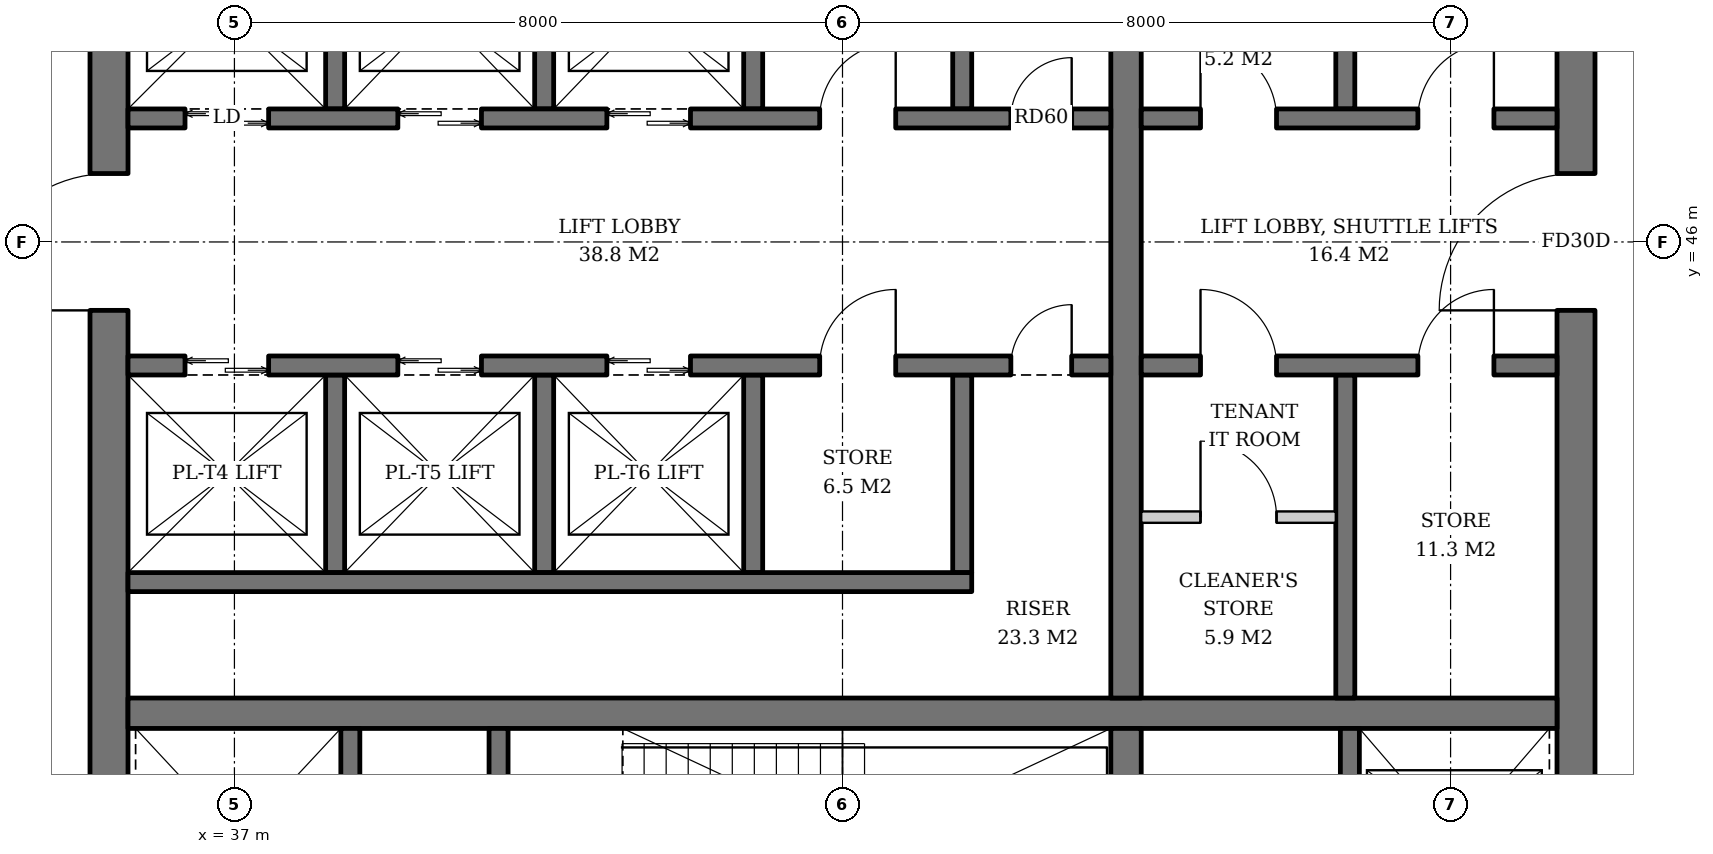
"""IFC4 building model, lengths in metres.
Left out: names, types, materials, properties, quantities, classifications, styles, units other than length and angle.
Written with IfcOpenShell. Run it as: python <this file> out.ifc"""

import sys

from ifc_helpers import new_model, si_unit, direction, frame, frame_2d, origin, place, context, subcontext, project, spatial, rectangle, extrude, element, fill, save


model = new_model("IFC4")
c1 = context("Model", 3, precision=1e-05, world=origin(), true_north=direction((0.0, 1.0)))
c2 = subcontext(c1, "Body", "Model", "MODEL_VIEW")
j1 = project(units=[si_unit("LENGTHUNIT", "METRE"), si_unit("PLANEANGLEUNIT", "RADIAN")], contexts=[c1])
p1 = place(None, origin())
s1 = spatial("IfcSite", under=j1, at=p1, CompositionType="ELEMENT")
p2 = place(p1, origin())
s2 = spatial("IfcBuilding", under=s1, at=p2, CompositionType="ELEMENT")
p3 = place(p2, frame((0.0, 0.0, 256.6)))
s3 = spatial("IfcBuildingStorey", under=s2, at=p3, CompositionType="ELEMENT", Elevation=256.6)
p4 = place(p3, frame((35.35, 36.6, 0.0), z_axis=(0.0, 0.0, 1.0), x_axis=(0.0, 1.0, 0.0)))
e1 = element("IfcWall", 1, at=p4, inside=s3, PredefinedType="SHEAR", context=c2, shape_type="SweptSolid", body=[
    extrude(rectangle(XDim=18.8, YDim=0.5, at=frame_2d((9.4, 0.0))), origin(), (0.0, 0.0, 1.0), 3.8),
])
p5 = place(p4, frame((8.5, 0.0, 0.0)))
e2 = element("IfcOpeningElement", 2, at=p5, cuts=e1, PredefinedType="OPENING", context=c2, shape_type="SweptSolid", body=[
    extrude(rectangle(XDim=1.8, YDim=2.4, at=frame_2d((0.9, 1.2))), frame((0.0, 0.26, 0.0), z_axis=(0.0, -1.0, 0.0), x_axis=(1.0, 0.0, 0.0)), (0.0, 0.0, 1.0), 0.52),
])
p6 = place(p3, frame((54.65, 36.6, 0.0), z_axis=(0.0, 0.0, 1.0), x_axis=(0.0, 1.0, 0.0)))
e3 = element("IfcWall", 3, at=p6, inside=s3, PredefinedType="SHEAR", context=c2, shape_type="SweptSolid", body=[
    extrude(rectangle(XDim=18.8, YDim=0.5, at=frame_2d((9.4, 0.0))), origin(), (0.0, 0.0, 1.0), 3.8),
])
p7 = place(p6, frame((8.5, 0.0, 0.0)))
e4 = element("IfcOpeningElement", 4, at=p7, cuts=e3, PredefinedType="OPENING", context=c2, shape_type="SweptSolid", body=[
    extrude(rectangle(XDim=1.8, YDim=2.4, at=frame_2d((0.9, 1.2))), frame((0.0, 0.26, 0.0), z_axis=(0.0, -1.0, 0.0), x_axis=(1.0, 0.0, 0.0)), (0.0, 0.0, 1.0), 0.52),
])
p8 = place(p3, frame((35.6, 39.8, 0.0), z_axis=(0.0, 0.0, 1.0), x_axis=(1.0, 0.0, 0.0)))
e5 = element("IfcWall", 5, at=p8, inside=s3, PredefinedType="SHEAR", context=c2, shape_type="SweptSolid", body=[
    extrude(rectangle(XDim=18.8, YDim=0.4, at=frame_2d((9.4, 0.0))), origin(), (0.0, 0.0, 1.0), 3.8),
])
p9 = place(p3, frame((48.73, 36.6, 0.0), z_axis=(0.0, 0.0, 1.0), x_axis=(0.0, 1.0, 0.0)))
e6 = element("IfcWall", 6, at=p9, inside=s3, PredefinedType="SHEAR", context=c2, shape_type="SweptSolid", body=[
    extrude(rectangle(XDim=3.0, YDim=0.4, at=frame_2d((1.5, 0.0))), origin(), (0.0, 0.0, 1.0), 3.8),
])
p10 = place(p3, frame((48.73, 40.0, 0.0), z_axis=(0.0, 0.0, 1.0), x_axis=(0.0, 1.0, 0.0)))
e7 = element("IfcWall", 7, at=p10, inside=s3, PredefinedType="SHEAR", context=c2, shape_type="SweptSolid", body=[
    extrude(rectangle(XDim=12.0, YDim=0.4, at=frame_2d((6.0, 0.0))), origin(), (0.0, 0.0, 1.0), 3.8),
])
p11 = place(p3, frame((38.525, 36.6, 0.0), z_axis=(0.0, 0.0, 1.0), x_axis=(0.0, 1.0, 0.0)))
e8 = element("IfcWall", 8, at=p11, inside=s3, PredefinedType="SHEAR", context=c2, shape_type="SweptSolid", body=[
    extrude(rectangle(XDim=3.0, YDim=0.25, at=frame_2d((1.5, 0.0))), origin(), (0.0, 0.0, 1.0), 3.8),
])
p12 = place(p11, frame((0.9, 0.0, 0.0)))
e9 = element("IfcOpeningElement", 9, at=p12, cuts=e8, PredefinedType="OPENING", context=c2, shape_type="SweptSolid", body=[
    extrude(rectangle(XDim=1.3, YDim=2.2, at=frame_2d((0.65, 1.1))), frame((0.0, 0.135, 0.0), z_axis=(0.0, -1.0, 0.0), x_axis=(1.0, 0.0, 0.0)), (0.0, 0.0, 1.0), 0.27),
])
p13 = place(p3, frame((40.475, 36.6, 0.0), z_axis=(0.0, 0.0, 1.0), x_axis=(0.0, 1.0, 0.0)))
e10 = element("IfcWall", 10, at=p13, inside=s3, PredefinedType="SHEAR", context=c2, shape_type="SweptSolid", body=[
    extrude(rectangle(XDim=3.0, YDim=0.25, at=frame_2d((1.5, 0.0))), origin(), (0.0, 0.0, 1.0), 3.8),
])
p14 = place(p13, frame((0.85, 0.0, 0.0)))
e11 = element("IfcOpeningElement", 11, at=p14, cuts=e10, PredefinedType="OPENING", context=c2, shape_type="SweptSolid", body=[
    extrude(rectangle(XDim=1.2, YDim=2.1, at=frame_2d((0.6, 1.05))), frame((0.0, 0.135, 0.0), z_axis=(0.0, -1.0, 0.0), x_axis=(1.0, 0.0, 0.0)), (0.0, 0.0, 1.0), 0.27),
])
p15 = place(p3, frame((51.675, 36.6, 0.0), z_axis=(0.0, 0.0, 1.0), x_axis=(0.0, 1.0, 0.0)))
e12 = element("IfcWall", 12, at=p15, inside=s3, PredefinedType="SHEAR", context=c2, shape_type="SweptSolid", body=[
    extrude(rectangle(XDim=3.0, YDim=0.25, at=frame_2d((1.5, 0.0))), origin(), (0.0, 0.0, 1.0), 3.8),
])
p16 = place(p15, frame((0.85, 0.0, 0.0)))
e13 = element("IfcOpeningElement", 13, at=p16, cuts=e12, PredefinedType="OPENING", context=c2, shape_type="SweptSolid", body=[
    extrude(rectangle(XDim=1.4, YDim=2.4, at=frame_2d((0.7, 1.2))), frame((0.0, 0.135, 0.0), z_axis=(0.0, -1.0, 0.0), x_axis=(1.0, 0.0, 0.0)), (0.0, 0.0, 1.0), 0.27),
])
for number, where, z_axis, x_axis in (
    (14, (38.325, 47.75, 0.0), (0.0, 0.0, 1.0), (0.0, 1.0, 0.0)),
    (15, (41.075, 47.75, 0.0), (0.0, 0.0, 1.0), (0.0, 1.0, 0.0)),
    (16, (43.825, 47.75, 0.0), (0.0, 0.0, 1.0), (0.0, 1.0, 0.0)),
    (17, (46.575, 47.75, 0.0), (0.0, 0.0, 1.0), (0.0, 1.0, 0.0)),
):
    element("IfcWall", number, at=place(p3, frame(where, z_axis=z_axis, x_axis=x_axis)), inside=s3, PredefinedType="SHEAR", context=c2, shape_type="SweptSolid", body=[
        extrude(rectangle(XDim=2.6, YDim=0.25, at=frame_2d((1.3, 0.0))), origin(), (0.0, 0.0, 1.0), 3.8),
    ])
p17 = place(p3, frame((35.6, 47.625, 0.0), z_axis=(0.0, 0.0, 1.0), x_axis=(1.0, 0.0, 0.0)))
e18 = element("IfcWall", 18, at=p17, inside=s3, PredefinedType="SHEAR", context=c2, shape_type="SweptSolid", body=[
    extrude(rectangle(XDim=12.93, YDim=0.25, at=frame_2d((6.465, 0.0))), origin(), (0.0, 0.0, 1.0), 3.8),
])
p18 = place(p17, frame((0.75, 0.0, 0.0)))
e19 = element("IfcOpeningElement", 19, at=p18, cuts=e18, PredefinedType="OPENING", context=c2, shape_type="SweptSolid", body=[
    extrude(rectangle(XDim=1.1, YDim=2.2, at=frame_2d((0.55, 1.1))), frame((0.0, 0.135, 0.0), z_axis=(0.0, -1.0, 0.0), x_axis=(1.0, 0.0, 0.0)), (0.0, 0.0, 1.0), 0.27),
])
p19 = place(p17, frame((3.55, 0.0, 0.0)))
e20 = element("IfcOpeningElement", 20, at=p19, cuts=e18, PredefinedType="OPENING", context=c2, shape_type="SweptSolid", body=[
    extrude(rectangle(XDim=1.1, YDim=2.2, at=frame_2d((0.55, 1.1))), frame((0.0, 0.135, 0.0), z_axis=(0.0, -1.0, 0.0), x_axis=(1.0, 0.0, 0.0)), (0.0, 0.0, 1.0), 0.27),
])
p20 = place(p17, frame((6.3, 0.0, 0.0)))
e21 = element("IfcOpeningElement", 21, at=p20, cuts=e18, PredefinedType="OPENING", context=c2, shape_type="SweptSolid", body=[
    extrude(rectangle(XDim=1.1, YDim=2.2, at=frame_2d((0.55, 1.1))), frame((0.0, 0.135, 0.0), z_axis=(0.0, -1.0, 0.0), x_axis=(1.0, 0.0, 0.0)), (0.0, 0.0, 1.0), 0.27),
])
p21 = place(p17, frame((9.1, 0.0, 0.0)))
e22 = element("IfcOpeningElement", 22, at=p21, cuts=e18, PredefinedType="OPENING", context=c2, shape_type="SweptSolid", body=[
    extrude(rectangle(XDim=1.0, YDim=2.1, at=frame_2d((0.5, 1.05))), frame((0.0, 0.135, 0.0), z_axis=(0.0, -1.0, 0.0), x_axis=(1.0, 0.0, 0.0)), (0.0, 0.0, 1.0), 0.27),
])
p22 = place(p17, frame((11.615, 0.0, 0.0)))
e23 = element("IfcOpeningElement", 23, at=p22, cuts=e18, PredefinedType="OPENING", context=c2, shape_type="SweptSolid", body=[
    extrude(rectangle(XDim=0.8, YDim=2.0, at=frame_2d((0.4, 1.0))), frame((0.0, 0.135, 0.0), z_axis=(0.0, -1.0, 0.0), x_axis=(1.0, 0.0, 0.0)), (0.0, 0.0, 1.0), 0.27),
])
for number, where, z_axis, x_axis in (
    (24, (38.325, 44.25, 0.0), (0.0, 0.0, 1.0), (0.0, -1.0, 0.0)),
    (25, (41.075, 44.25, 0.0), (0.0, 0.0, 1.0), (0.0, -1.0, 0.0)),
    (26, (43.825, 44.25, 0.0), (0.0, 0.0, 1.0), (0.0, -1.0, 0.0)),
    (27, (46.575, 44.25, 0.0), (0.0, 0.0, 1.0), (0.0, -1.0, 0.0)),
):
    element("IfcWall", number, at=place(p3, frame(where, z_axis=z_axis, x_axis=x_axis)), inside=s3, PredefinedType="SHEAR", context=c2, shape_type="SweptSolid", body=[
        extrude(rectangle(XDim=2.6, YDim=0.25, at=frame_2d((1.3, 0.0))), origin(), (0.0, 0.0, 1.0), 3.8),
    ])
p23 = place(p3, frame((35.6, 41.525, 0.0), z_axis=(0.0, 0.0, 1.0), x_axis=(1.0, 0.0, 0.0)))
e28 = element("IfcWall", 28, at=p23, inside=s3, PredefinedType="SHEAR", context=c2, shape_type="SweptSolid", body=[
    extrude(rectangle(XDim=11.1, YDim=0.25, at=frame_2d((5.55, 0.0))), origin(), (0.0, 0.0, 1.0), 3.8),
])
p24 = place(p3, frame((35.6, 44.375, 0.0), z_axis=(0.0, 0.0, 1.0), x_axis=(1.0, 0.0, 0.0)))
e29 = element("IfcWall", 29, at=p24, inside=s3, PredefinedType="SHEAR", context=c2, shape_type="SweptSolid", body=[
    extrude(rectangle(XDim=12.93, YDim=0.25, at=frame_2d((6.465, 0.0))), origin(), (0.0, 0.0, 1.0), 3.8),
])
p25 = place(p24, frame((0.75, 0.0, 0.0)))
e30 = element("IfcOpeningElement", 30, at=p25, cuts=e29, PredefinedType="OPENING", context=c2, shape_type="SweptSolid", body=[
    extrude(rectangle(XDim=1.1, YDim=2.2, at=frame_2d((0.55, 1.1))), frame((0.0, 0.135, 0.0), z_axis=(0.0, -1.0, 0.0), x_axis=(1.0, 0.0, 0.0)), (0.0, 0.0, 1.0), 0.27),
])
p26 = place(p24, frame((3.55, 0.0, 0.0)))
e31 = element("IfcOpeningElement", 31, at=p26, cuts=e29, PredefinedType="OPENING", context=c2, shape_type="SweptSolid", body=[
    extrude(rectangle(XDim=1.1, YDim=2.2, at=frame_2d((0.55, 1.1))), frame((0.0, 0.135, 0.0), z_axis=(0.0, -1.0, 0.0), x_axis=(1.0, 0.0, 0.0)), (0.0, 0.0, 1.0), 0.27),
])
p27 = place(p24, frame((6.3, 0.0, 0.0)))
e32 = element("IfcOpeningElement", 32, at=p27, cuts=e29, PredefinedType="OPENING", context=c2, shape_type="SweptSolid", body=[
    extrude(rectangle(XDim=1.1, YDim=2.2, at=frame_2d((0.55, 1.1))), frame((0.0, 0.135, 0.0), z_axis=(0.0, -1.0, 0.0), x_axis=(1.0, 0.0, 0.0)), (0.0, 0.0, 1.0), 0.27),
])
p28 = place(p24, frame((9.1, 0.0, 0.0)))
e33 = element("IfcOpeningElement", 33, at=p28, cuts=e29, PredefinedType="OPENING", context=c2, shape_type="SweptSolid", body=[
    extrude(rectangle(XDim=1.0, YDim=2.1, at=frame_2d((0.5, 1.05))), frame((0.0, 0.135, 0.0), z_axis=(0.0, -1.0, 0.0), x_axis=(1.0, 0.0, 0.0)), (0.0, 0.0, 1.0), 0.27),
])
p29 = place(p24, frame((11.615, 0.0, 0.0)))
e34 = element("IfcOpeningElement", 34, at=p29, cuts=e29, PredefinedType="OPENING", context=c2, shape_type="SweptSolid", body=[
    extrude(rectangle(XDim=0.8, YDim=2.0, at=frame_2d((0.4, 1.0))), frame((0.0, 0.135, 0.0), z_axis=(0.0, -1.0, 0.0), x_axis=(1.0, 0.0, 0.0)), (0.0, 0.0, 1.0), 0.27),
])
p30 = place(p3, frame((51.615, 47.75, 0.0), z_axis=(0.0, 0.0, 1.0), x_axis=(0.0, 1.0, 0.0)))
e35 = element("IfcWall", 35, at=p30, inside=s3, PredefinedType="SHEAR", context=c2, shape_type="SweptSolid", body=[
    extrude(rectangle(XDim=4.25, YDim=0.25, at=frame_2d((2.125, 0.0))), origin(), (0.0, 0.0, 1.0), 3.8),
])
p31 = place(p3, frame((48.93, 47.625, 0.0), z_axis=(0.0, 0.0, 1.0), x_axis=(1.0, 0.0, 0.0)))
e36 = element("IfcWall", 36, at=p31, inside=s3, PredefinedType="SHEAR", context=c2, shape_type="SweptSolid", body=[
    extrude(rectangle(XDim=5.47, YDim=0.25, at=frame_2d((2.735, 0.0))), origin(), (0.0, 0.0, 1.0), 3.8),
])
p32 = place(p31, frame((0.78, 0.0, 0.0)))
e37 = element("IfcOpeningElement", 37, at=p32, cuts=e36, PredefinedType="OPENING", context=c2, shape_type="SweptSolid", body=[
    extrude(rectangle(XDim=1.0, YDim=2.1, at=frame_2d((0.5, 1.05))), frame((0.0, 0.135, 0.0), z_axis=(0.0, -1.0, 0.0), x_axis=(1.0, 0.0, 0.0)), (0.0, 0.0, 1.0), 0.27),
])
p33 = place(p31, frame((3.64, 0.0, 0.0)))
e38 = element("IfcOpeningElement", 38, at=p33, cuts=e36, PredefinedType="OPENING", context=c2, shape_type="SweptSolid", body=[
    extrude(rectangle(XDim=1.0, YDim=2.1, at=frame_2d((0.5, 1.05))), frame((0.0, 0.135, 0.0), z_axis=(0.0, -1.0, 0.0), x_axis=(1.0, 0.0, 0.0)), (0.0, 0.0, 1.0), 0.27),
])
p34 = place(p3, frame((51.615, 44.25, 0.0), z_axis=(0.0, 0.0, 1.0), x_axis=(0.0, -1.0, 0.0)))
e39 = element("IfcWall", 39, at=p34, inside=s3, PredefinedType="SHEAR", context=c2, shape_type="SweptSolid", body=[
    extrude(rectangle(XDim=4.25, YDim=0.25, at=frame_2d((2.125, 0.0))), origin(), (0.0, 0.0, 1.0), 3.8),
])
p35 = place(p3, frame((48.93, 44.375, 0.0), z_axis=(0.0, 0.0, 1.0), x_axis=(1.0, 0.0, 0.0)))
e40 = element("IfcWall", 40, at=p35, inside=s3, PredefinedType="SHEAR", context=c2, shape_type="SweptSolid", body=[
    extrude(rectangle(XDim=5.47, YDim=0.25, at=frame_2d((2.735, 0.0))), origin(), (0.0, 0.0, 1.0), 3.8),
])
p36 = place(p35, frame((0.78, 0.0, 0.0)))
e41 = element("IfcOpeningElement", 41, at=p36, cuts=e40, PredefinedType="OPENING", context=c2, shape_type="SweptSolid", body=[
    extrude(rectangle(XDim=1.0, YDim=2.1, at=frame_2d((0.5, 1.05))), frame((0.0, 0.135, 0.0), z_axis=(0.0, -1.0, 0.0), x_axis=(1.0, 0.0, 0.0)), (0.0, 0.0, 1.0), 0.27),
])
p37 = place(p35, frame((3.64, 0.0, 0.0)))
e42 = element("IfcOpeningElement", 42, at=p37, cuts=e40, PredefinedType="OPENING", context=c2, shape_type="SweptSolid", body=[
    extrude(rectangle(XDim=1.0, YDim=2.1, at=frame_2d((0.5, 1.05))), frame((0.0, 0.135, 0.0), z_axis=(0.0, -1.0, 0.0), x_axis=(1.0, 0.0, 0.0)), (0.0, 0.0, 1.0), 0.27),
])
p38 = place(p3, frame((48.93, 42.38, 0.0), z_axis=(0.0, 0.0, 1.0), x_axis=(1.0, 0.0, 0.0)))
e43 = element("IfcWall", 43, at=p38, inside=s3, PredefinedType="SOLIDWALL", context=c2, shape_type="SweptSolid", body=[
    extrude(rectangle(XDim=2.56, YDim=0.15, at=frame_2d((1.28, 0.0))), origin(), (0.0, 0.0, 1.0), 3.62),
])
p39 = place(p38, frame((0.78, 0.0, 0.0)))
e44 = element("IfcOpeningElement", 44, at=p39, cuts=e43, PredefinedType="OPENING", context=c2, shape_type="SweptSolid", body=[
    extrude(rectangle(XDim=1.0, YDim=2.1, at=frame_2d((0.5, 1.05))), frame((0.0, 0.085, 0.0), z_axis=(0.0, -1.0, 0.0), x_axis=(1.0, 0.0, 0.0)), (0.0, 0.0, 1.0), 0.17),
])
p40 = place(p18, origin())
e45 = element("IfcDoor", 45, at=p40, inside=s3, OperationType="DOUBLE_DOOR_SLIDING", PredefinedType="DOOR", context=c2, shape_type="SweptSolid", body=[
    extrude(rectangle(XDim=1.1, YDim=2.2, at=frame_2d((0.55, 1.1))), frame((0.0, 0.025, 0.0), z_axis=(0.0, -1.0, 0.0), x_axis=(1.0, 0.0, 0.0)), (0.0, 0.0, 1.0), 0.05),
])
fill(e19, e45)
p41 = place(p19, origin())
e46 = element("IfcDoor", 46, at=p41, inside=s3, OperationType="DOUBLE_DOOR_SLIDING", PredefinedType="DOOR", context=c2, shape_type="SweptSolid", body=[
    extrude(rectangle(XDim=1.1, YDim=2.2, at=frame_2d((0.55, 1.1))), frame((0.0, 0.025, 0.0), z_axis=(0.0, -1.0, 0.0), x_axis=(1.0, 0.0, 0.0)), (0.0, 0.0, 1.0), 0.05),
])
fill(e20, e46)
p42 = place(p20, origin())
e47 = element("IfcDoor", 47, at=p42, inside=s3, OperationType="DOUBLE_DOOR_SLIDING", PredefinedType="DOOR", context=c2, shape_type="SweptSolid", body=[
    extrude(rectangle(XDim=1.1, YDim=2.2, at=frame_2d((0.55, 1.1))), frame((0.0, 0.025, 0.0), z_axis=(0.0, -1.0, 0.0), x_axis=(1.0, 0.0, 0.0)), (0.0, 0.0, 1.0), 0.05),
])
fill(e21, e47)
p43 = place(p21, origin())
e48 = element("IfcDoor", 48, at=p43, inside=s3, OperationType="SINGLE_SWING_RIGHT", PredefinedType="DOOR", context=c2, shape_type="SweptSolid", body=[
    extrude(rectangle(XDim=1.0, YDim=2.1, at=frame_2d((0.5, 1.05))), frame((0.0, 0.025, 0.0), z_axis=(0.0, -1.0, 0.0), x_axis=(1.0, 0.0, 0.0)), (0.0, 0.0, 1.0), 0.05),
])
fill(e22, e48)
p44 = place(p22, origin())
e49 = element("IfcDoor", 49, at=p44, inside=s3, OperationType="SINGLE_SWING_RIGHT", PredefinedType="DOOR", context=c2, shape_type="SweptSolid", body=[
    extrude(rectangle(XDim=0.8, YDim=2.0, at=frame_2d((0.4, 1.0))), frame((0.0, 0.025, 0.0), z_axis=(0.0, -1.0, 0.0), x_axis=(1.0, 0.0, 0.0)), (0.0, 0.0, 1.0), 0.05),
])
fill(e23, e49)
p45 = place(p25, origin())
e50 = element("IfcDoor", 50, at=p45, inside=s3, OperationType="DOUBLE_DOOR_SLIDING", PredefinedType="DOOR", context=c2, shape_type="SweptSolid", body=[
    extrude(rectangle(XDim=1.1, YDim=2.2, at=frame_2d((0.55, 1.1))), frame((0.0, 0.025, 0.0), z_axis=(0.0, -1.0, 0.0), x_axis=(1.0, 0.0, 0.0)), (0.0, 0.0, 1.0), 0.05),
])
fill(e30, e50)
p46 = place(p26, origin())
e51 = element("IfcDoor", 51, at=p46, inside=s3, OperationType="DOUBLE_DOOR_SLIDING", PredefinedType="DOOR", context=c2, shape_type="SweptSolid", body=[
    extrude(rectangle(XDim=1.1, YDim=2.2, at=frame_2d((0.55, 1.1))), frame((0.0, 0.025, 0.0), z_axis=(0.0, -1.0, 0.0), x_axis=(1.0, 0.0, 0.0)), (0.0, 0.0, 1.0), 0.05),
])
fill(e31, e51)
p47 = place(p27, origin())
e52 = element("IfcDoor", 52, at=p47, inside=s3, OperationType="DOUBLE_DOOR_SLIDING", PredefinedType="DOOR", context=c2, shape_type="SweptSolid", body=[
    extrude(rectangle(XDim=1.1, YDim=2.2, at=frame_2d((0.55, 1.1))), frame((0.0, 0.025, 0.0), z_axis=(0.0, -1.0, 0.0), x_axis=(1.0, 0.0, 0.0)), (0.0, 0.0, 1.0), 0.05),
])
fill(e32, e52)
p48 = place(p28, origin())
e53 = element("IfcDoor", 53, at=p48, inside=s3, OperationType="SINGLE_SWING_RIGHT", PredefinedType="DOOR", context=c2, shape_type="SweptSolid", body=[
    extrude(rectangle(XDim=1.0, YDim=2.1, at=frame_2d((0.5, 1.05))), frame((0.0, 0.025, 0.0), z_axis=(0.0, -1.0, 0.0), x_axis=(1.0, 0.0, 0.0)), (0.0, 0.0, 1.0), 0.05),
])
fill(e33, e53)
p49 = place(p29, origin())
e54 = element("IfcDoor", 54, at=p49, inside=s3, OperationType="SINGLE_SWING_RIGHT", PredefinedType="DOOR", context=c2, shape_type="SweptSolid", body=[
    extrude(rectangle(XDim=0.8, YDim=2.0, at=frame_2d((0.4, 1.0))), frame((0.0, 0.025, 0.0), z_axis=(0.0, -1.0, 0.0), x_axis=(1.0, 0.0, 0.0)), (0.0, 0.0, 1.0), 0.05),
])
fill(e34, e54)
p50 = place(p32, origin())
e55 = element("IfcDoor", 55, at=p50, inside=s3, OperationType="SINGLE_SWING_LEFT", PredefinedType="DOOR", context=c2, shape_type="SweptSolid", body=[
    extrude(rectangle(XDim=1.0, YDim=2.1, at=frame_2d((0.5, 1.05))), frame((0.0, 0.025, 0.0), z_axis=(0.0, -1.0, 0.0), x_axis=(1.0, 0.0, 0.0)), (0.0, 0.0, 1.0), 0.05),
])
fill(e37, e55)
p51 = place(p33, origin())
e56 = element("IfcDoor", 56, at=p51, inside=s3, OperationType="SINGLE_SWING_RIGHT", PredefinedType="DOOR", context=c2, shape_type="SweptSolid", body=[
    extrude(rectangle(XDim=1.0, YDim=2.1, at=frame_2d((0.5, 1.05))), frame((0.0, 0.025, 0.0), z_axis=(0.0, -1.0, 0.0), x_axis=(1.0, 0.0, 0.0)), (0.0, 0.0, 1.0), 0.05),
])
fill(e38, e56)
p52 = place(p36, origin())
e57 = element("IfcDoor", 57, at=p52, inside=s3, OperationType="SINGLE_SWING_LEFT", PredefinedType="DOOR", context=c2, shape_type="SweptSolid", body=[
    extrude(rectangle(XDim=1.0, YDim=2.1, at=frame_2d((0.5, 1.05))), frame((0.0, 0.025, 0.0), z_axis=(0.0, -1.0, 0.0), x_axis=(1.0, 0.0, 0.0)), (0.0, 0.0, 1.0), 0.05),
])
fill(e41, e57)
p53 = place(p37, origin())
e58 = element("IfcDoor", 58, at=p53, inside=s3, OperationType="SINGLE_SWING_RIGHT", PredefinedType="DOOR", context=c2, shape_type="SweptSolid", body=[
    extrude(rectangle(XDim=1.0, YDim=2.1, at=frame_2d((0.5, 1.05))), frame((0.0, 0.025, 0.0), z_axis=(0.0, -1.0, 0.0), x_axis=(1.0, 0.0, 0.0)), (0.0, 0.0, 1.0), 0.05),
])
fill(e42, e58)
p54 = place(p39, origin())
e59 = element("IfcDoor", 59, at=p54, inside=s3, OperationType="SINGLE_SWING_LEFT", PredefinedType="DOOR", context=c2, shape_type="SweptSolid", body=[
    extrude(rectangle(XDim=1.0, YDim=2.1, at=frame_2d((0.5, 1.05))), frame((0.0, 0.025, 0.0), z_axis=(0.0, -1.0, 0.0), x_axis=(1.0, 0.0, 0.0)), (0.0, 0.0, 1.0), 0.05),
])
fill(e44, e59)
p55 = place(p5, origin())
e60 = element("IfcDoor", 60, at=p55, inside=s3, OperationType="DOUBLE_DOOR_SINGLE_SWING", PredefinedType="DOOR", context=c2, shape_type="SweptSolid", body=[
    extrude(rectangle(XDim=1.8, YDim=2.4, at=frame_2d((0.9, 1.2))), frame((0.0, 0.025, 0.0), z_axis=(0.0, -1.0, 0.0), x_axis=(1.0, 0.0, 0.0)), (0.0, 0.0, 1.0), 0.05),
])
fill(e2, e60)
p56 = place(p7, origin())
e61 = element("IfcDoor", 61, at=p56, inside=s3, OperationType="DOUBLE_DOOR_SINGLE_SWING", PredefinedType="DOOR", context=c2, shape_type="SweptSolid", body=[
    extrude(rectangle(XDim=1.8, YDim=2.4, at=frame_2d((0.9, 1.2))), frame((0.0, 0.025, 0.0), z_axis=(0.0, -1.0, 0.0), x_axis=(1.0, 0.0, 0.0)), (0.0, 0.0, 1.0), 0.05),
])
fill(e4, e61)
save(model, sys.argv[1])
